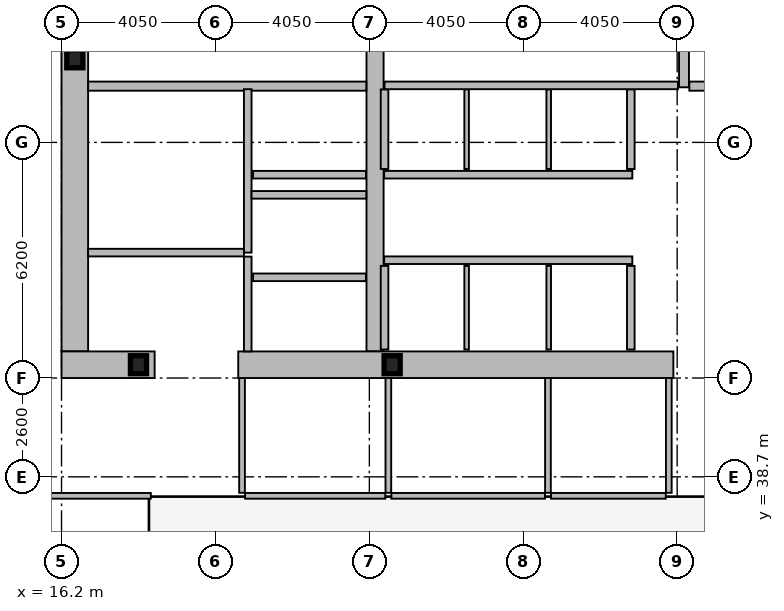
"""IFC4 building model, lengths in metres.
Left out: names, types, materials, properties, quantities, classifications, styles, units other than length and angle.
Written with IfcOpenShell. Run it as: python <this file> out.ifc"""

import sys

from ifc_helpers import new_model, si_unit, direction, frame, frame_2d, origin, origin_2d, place, context, subcontext, project, spatial, rectangle, i_section, extrude, element, fill, save


model = new_model("IFC4")
c1 = context("Model", 3, precision=1e-05, world=origin(), true_north=direction((0.0, 1.0)))
c2 = subcontext(c1, "Body", "Model", "MODEL_VIEW")
j1 = project(units=[si_unit("LENGTHUNIT", "METRE"), si_unit("PLANEANGLEUNIT", "RADIAN")], contexts=[c1])
p1 = place(None, origin())
s1 = spatial("IfcSite", under=j1, at=p1, CompositionType="ELEMENT")
p2 = place(p1, origin())
s2 = spatial("IfcBuilding", under=s1, at=p2, CompositionType="ELEMENT")
p3 = place(p2, frame((0.0, 0.0, 106.6)))
s3 = spatial("IfcBuildingStorey", under=s2, at=p3, CompositionType="ELEMENT", Elevation=106.6)
p4 = place(p3, frame((16.55, 42.0, 0.0), z_axis=(0.0, 0.0, 1.0), x_axis=(0.0, 1.0, 0.0)))
e1 = element("IfcWall", 1, at=p4, inside=s3, PredefinedType="SHEAR", context=c2, shape_type="SweptSolid", body=[
    extrude(rectangle(XDim=11.0, YDim=0.7, at=frame_2d((5.5, 0.0))), origin(), (0.0, 0.0, 1.0), 4.24),
])
p5 = place(p3, frame((24.45, 42.0, 0.0), z_axis=(0.0, 0.0, 1.0), x_axis=(0.0, 1.0, 0.0)))
e2 = element("IfcWall", 2, at=p5, inside=s3, PredefinedType="SHEAR", context=c2, shape_type="SweptSolid", body=[
    extrude(rectangle(XDim=11.0, YDim=0.45, at=frame_2d((5.5, 0.0))), origin(), (0.0, 0.0, 1.0), 4.24),
])
p6 = place(p3, frame((18.65, 41.65, 0.0), z_axis=(0.0, 0.0, 1.0), x_axis=(-1.0, 0.0, 0.0)))
e3 = element("IfcWall", 3, at=p6, inside=s3, PredefinedType="SHEAR", context=c2, shape_type="SweptSolid", body=[
    extrude(rectangle(XDim=2.45, YDim=0.7, at=frame_2d((1.225, 0.0))), origin(), (0.0, 0.0, 1.0), 4.24),
])
p7 = place(p3, frame((32.3, 41.65, 0.0), z_axis=(0.0, 0.0, 1.0), x_axis=(-1.0, 0.0, 0.0)))
e4 = element("IfcWall", 4, at=p7, inside=s3, PredefinedType="SHEAR", context=c2, shape_type="SweptSolid", body=[
    extrude(rectangle(XDim=11.45, YDim=0.7, at=frame_2d((5.725, 0.0))), origin(), (0.0, 0.0, 1.0), 4.24),
])
p8 = place(p3, frame((32.58, 48.95, 0.0), z_axis=(0.0, 0.0, 1.0), x_axis=(0.0, 1.0, 0.0)))
e5 = element("IfcWall", 5, at=p8, inside=s3, PredefinedType="SHEAR", context=c2, shape_type="SweptSolid", body=[
    extrude(rectangle(XDim=4.05, YDim=0.26, at=frame_2d((2.025, 0.0))), origin(), (0.0, 0.0, 1.0), 4.24),
])
p9 = place(p3, frame((16.9, 48.98, 0.0), z_axis=(0.0, 0.0, 1.0), x_axis=(1.0, 0.0, 0.0)))
e6 = element("IfcWall", 6, at=p9, inside=s3, PredefinedType="SHEAR", context=c2, shape_type="SweptSolid", body=[
    extrude(rectangle(XDim=7.32, YDim=0.24, at=frame_2d((3.66, 0.0))), origin(), (0.0, 0.0, 1.0), 4.24),
])
p10 = place(p9, frame((0.22, 0.0, 0.0)))
e7 = element("IfcOpeningElement", 7, at=p10, cuts=e6, PredefinedType="OPENING", context=c2, shape_type="SweptSolid", body=[
    extrude(rectangle(XDim=1.05, YDim=2.15, at=frame_2d((0.525, 1.075))), frame((0.0, 0.13, 0.0), z_axis=(0.0, -1.0, 0.0), x_axis=(1.0, 0.0, 0.0)), (0.0, 0.0, 1.0), 0.26),
])
p11 = place(p3, frame((32.72, 48.98, 0.0), z_axis=(0.0, 0.0, 1.0), x_axis=(1.0, 0.0, 0.0)))
e8 = element("IfcWall", 8, at=p11, inside=s3, PredefinedType="SHEAR", context=c2, shape_type="SweptSolid", body=[
    extrude(rectangle(XDim=7.56, YDim=0.24, at=frame_2d((3.78, 0.0))), origin(), (0.0, 0.0, 1.0), 4.24),
])
p12 = place(p11, frame((0.22, 0.0, 0.0)))
e9 = element("IfcOpeningElement", 9, at=p12, cuts=e8, PredefinedType="OPENING", context=c2, shape_type="SweptSolid", body=[
    extrude(rectangle(XDim=1.05, YDim=2.15, at=frame_2d((0.525, 1.075))), frame((0.0, 0.13, 0.0), z_axis=(0.0, -1.0, 0.0), x_axis=(1.0, 0.0, 0.0)), (0.0, 0.0, 1.0), 0.26),
])
for number, where, z_axis, x_axis in (
    (10, (16.55, 49.7, 0.0), (0.0, 0.0, 1.0), (1.0, 0.0, 0.0)),
    (11, (18.225, 41.65, 0.0), (0.0, 0.0, 1.0), (1.0, 0.0, 0.0)),
    (12, (24.9, 41.65, 0.0), (0.0, 0.0, 1.0), (1.0, 0.0, 0.0)),
):
    element("IfcColumn", number, at=place(p3, frame(where, z_axis=z_axis, x_axis=x_axis)), inside=s3, PredefinedType="COLUMN", context=c2, shape_type="SweptSolid", body=[
        extrude(i_section(OverallWidth=0.424, OverallDepth=0.474, WebThickness=0.048, FlangeThickness=0.077, at=origin_2d()), origin(), (0.0, 0.0, 1.0), 4.4),
    ])
p13 = place(p3, frame((24.69, 44.4, 0.0), z_axis=(0.0, 0.0, 1.0), x_axis=(1.0, 0.0, 0.0)))
e13 = element("IfcWall", 13, at=p13, inside=s3, PredefinedType="PARTITIONING", context=c2, shape_type="SweptSolid", body=[
    extrude(rectangle(XDim=6.53, YDim=0.2, at=frame_2d((3.265, 0.0))), origin(), (0.0, 0.0, 1.0), 4.24),
])
p14 = place(p13, frame((0.53, 0.0, 0.0)))
e14 = element("IfcOpeningElement", 14, at=p14, cuts=e13, PredefinedType="OPENING", context=c2, shape_type="SweptSolid", body=[
    extrude(rectangle(XDim=1.1, YDim=2.18, at=frame_2d((0.55, 1.09))), frame((0.0, 0.11, 0.0), z_axis=(0.0, -1.0, 0.0), x_axis=(1.0, 0.0, 0.0)), (0.0, 0.0, 1.0), 0.22),
])
p15 = place(p13, frame((2.69, 0.0, 0.0)))
e15 = element("IfcOpeningElement", 15, at=p15, cuts=e13, PredefinedType="OPENING", context=c2, shape_type="SweptSolid", body=[
    extrude(rectangle(XDim=1.1, YDim=2.18, at=frame_2d((0.55, 1.09))), frame((0.0, 0.11, 0.0), z_axis=(0.0, -1.0, 0.0), x_axis=(1.0, 0.0, 0.0)), (0.0, 0.0, 1.0), 0.22),
])
p16 = place(p13, frame((4.85, 0.0, 0.0)))
e16 = element("IfcOpeningElement", 16, at=p16, cuts=e13, PredefinedType="OPENING", context=c2, shape_type="SweptSolid", body=[
    extrude(rectangle(XDim=1.1, YDim=2.18, at=frame_2d((0.55, 1.09))), frame((0.0, 0.11, 0.0), z_axis=(0.0, -1.0, 0.0), x_axis=(1.0, 0.0, 0.0)), (0.0, 0.0, 1.0), 0.22),
])
p17 = place(p3, frame((24.21, 43.95, 0.0), z_axis=(0.0, 0.0, 1.0), x_axis=(-1.0, 0.0, 0.0)))
e17 = element("IfcWall", 17, at=p17, inside=s3, PredefinedType="PARTITIONING", context=c2, shape_type="SweptSolid", body=[
    extrude(rectangle(XDim=2.97, YDim=0.2, at=frame_2d((1.485, 0.0))), origin(), (0.0, 0.0, 1.0), 4.24),
])
p18 = place(p17, frame((0.86, 0.0, 0.0)))
e18 = element("IfcOpeningElement", 18, at=p18, cuts=e17, PredefinedType="OPENING", context=c2, shape_type="SweptSolid", body=[
    extrude(rectangle(XDim=1.3, YDim=2.18, at=frame_2d((0.65, 1.09))), frame((0.0, 0.11, 0.0), z_axis=(0.0, -1.0, 0.0), x_axis=(1.0, 0.0, 0.0)), (0.0, 0.0, 1.0), 0.22),
])
p19 = place(p3, frame((24.21, 46.65, 0.0), z_axis=(0.0, 0.0, 1.0), x_axis=(-1.0, 0.0, 0.0)))
e19 = element("IfcWall", 19, at=p19, inside=s3, PredefinedType="PARTITIONING", context=c2, shape_type="SweptSolid", body=[
    extrude(rectangle(XDim=2.97, YDim=0.2, at=frame_2d((1.485, 0.0))), origin(), (0.0, 0.0, 1.0), 4.24),
])
p20 = place(p19, frame((0.91, 0.0, 0.0)))
e20 = element("IfcOpeningElement", 20, at=p20, cuts=e19, PredefinedType="OPENING", context=c2, shape_type="SweptSolid", body=[
    extrude(rectangle(XDim=1.2, YDim=2.18, at=frame_2d((0.6, 1.09))), frame((0.0, 0.11, 0.0), z_axis=(0.0, -1.0, 0.0), x_axis=(1.0, 0.0, 0.0)), (0.0, 0.0, 1.0), 0.22),
])
p21 = place(p3, frame((31.22, 46.65, 0.0), z_axis=(0.0, 0.0, 1.0), x_axis=(-1.0, 0.0, 0.0)))
e21 = element("IfcWall", 21, at=p21, inside=s3, PredefinedType="PARTITIONING", context=c2, shape_type="SweptSolid", body=[
    extrude(rectangle(XDim=6.53, YDim=0.2, at=frame_2d((3.265, 0.0))), origin(), (0.0, 0.0, 1.0), 4.24),
])
p22 = place(p21, frame((4.9, 0.0, 0.0)))
e22 = element("IfcOpeningElement", 22, at=p22, cuts=e21, PredefinedType="OPENING", context=c2, shape_type="SweptSolid", body=[
    extrude(rectangle(XDim=1.1, YDim=2.18, at=frame_2d((0.55, 1.09))), frame((0.0, 0.11, 0.0), z_axis=(0.0, -1.0, 0.0), x_axis=(1.0, 0.0, 0.0)), (0.0, 0.0, 1.0), 0.22),
])
p23 = place(p21, frame((2.74, 0.0, 0.0)))
e23 = element("IfcOpeningElement", 23, at=p23, cuts=e21, PredefinedType="OPENING", context=c2, shape_type="SweptSolid", body=[
    extrude(rectangle(XDim=1.1, YDim=2.18, at=frame_2d((0.55, 1.09))), frame((0.0, 0.11, 0.0), z_axis=(0.0, -1.0, 0.0), x_axis=(1.0, 0.0, 0.0)), (0.0, 0.0, 1.0), 0.22),
])
p24 = place(p21, frame((0.58, 0.0, 0.0)))
e24 = element("IfcOpeningElement", 24, at=p24, cuts=e21, PredefinedType="OPENING", context=c2, shape_type="SweptSolid", body=[
    extrude(rectangle(XDim=1.1, YDim=2.18, at=frame_2d((0.55, 1.09))), frame((0.0, 0.11, 0.0), z_axis=(0.0, -1.0, 0.0), x_axis=(1.0, 0.0, 0.0)), (0.0, 0.0, 1.0), 0.22),
])
p25 = place(p3, frame((21.1, 44.6, 0.0), z_axis=(0.0, 0.0, 1.0), x_axis=(0.0, 1.0, 0.0)))
e25 = element("IfcWall", 25, at=p25, inside=s3, PredefinedType="PARTITIONING", context=c2, shape_type="SweptSolid", body=[
    extrude(rectangle(XDim=4.3, YDim=0.2, at=frame_2d((2.15, 0.0))), origin(), (0.0, 0.0, 1.0), 4.24),
])
p26 = place(p3, frame((16.9, 44.6, 0.0), z_axis=(0.0, 0.0, 1.0), x_axis=(1.0, 0.0, 0.0)))
e26 = element("IfcWall", 26, at=p26, inside=s3, PredefinedType="PARTITIONING", context=c2, shape_type="SweptSolid", body=[
    extrude(rectangle(XDim=4.1, YDim=0.2, at=frame_2d((2.05, 0.0))), origin(), (0.0, 0.0, 1.0), 4.24),
])
p27 = place(p26, frame((1.25, 0.0, 0.0)))
e27 = element("IfcOpeningElement", 27, at=p27, cuts=e26, PredefinedType="OPENING", context=c2, shape_type="SweptSolid", body=[
    extrude(rectangle(XDim=1.05, YDim=2.15, at=frame_2d((0.525, 1.075))), frame((0.0, 0.11, 0.0), z_axis=(0.0, -1.0, 0.0), x_axis=(1.0, 0.0, 0.0)), (0.0, 0.0, 1.0), 0.22),
])
p28 = place(p3, frame((21.2, 46.12, 0.0), z_axis=(0.0, 0.0, 1.0), x_axis=(1.0, 0.0, 0.0)))
e28 = element("IfcWall", 28, at=p28, inside=s3, PredefinedType="PARTITIONING", context=c2, shape_type="SweptSolid", body=[
    extrude(rectangle(XDim=3.02, YDim=0.2, at=frame_2d((1.51, 0.0))), origin(), (0.0, 0.0, 1.0), 4.24),
])
p29 = place(p3, frame((21.1, 42.0, 0.0), z_axis=(0.0, 0.0, 1.0), x_axis=(0.0, 1.0, 0.0)))
e29 = element("IfcWall", 29, at=p29, inside=s3, PredefinedType="PARTITIONING", context=c2, shape_type="SweptSolid", body=[
    extrude(rectangle(XDim=2.495, YDim=0.2, at=frame_2d((1.248, 0.0))), origin(), (0.0, 0.0, 1.0), 4.24),
])
p30 = place(p29, frame((0.38, 0.0, 0.0)))
e30 = element("IfcOpeningElement", 30, at=p30, cuts=e29, PredefinedType="OPENING", context=c2, shape_type="SweptSolid", body=[
    extrude(rectangle(XDim=1.05, YDim=2.15, at=frame_2d((0.525, 1.075))), frame((0.0, 0.11, 0.0), z_axis=(0.0, -1.0, 0.0), x_axis=(1.0, 0.0, 0.0)), (0.0, 0.0, 1.0), 0.22),
])
for number, where, z_axis, x_axis in (
    (31, (24.7, 46.8, 0.0), (0.0, 0.0, 1.0), (0.0, 1.0, 0.0)),
    (32, (31.18, 46.8, 0.0), (0.0, 0.0, 1.0), (0.0, 1.0, 0.0)),
):
    element("IfcWall", number, at=place(p3, frame(where, z_axis=z_axis, x_axis=x_axis)), inside=s3, PredefinedType="PARTITIONING", context=c2, shape_type="SweptSolid", body=[
        extrude(rectangle(XDim=2.095, YDim=0.2, at=frame_2d((1.047, 0.0))), origin(), (0.0, 0.0, 1.0), 4.24),
    ])
for number, where, z_axis, x_axis in (
    (33, (26.86, 46.8, 0.0), (0.0, 0.0, 1.0), (0.0, 1.0, 0.0)),
    (34, (29.02, 46.8, 0.0), (0.0, 0.0, 1.0), (0.0, 1.0, 0.0)),
):
    element("IfcWall", number, at=place(p3, frame(where, z_axis=z_axis, x_axis=x_axis)), inside=s3, PredefinedType="PARTITIONING", context=c2, shape_type="SweptSolid", body=[
        extrude(rectangle(XDim=2.095, YDim=0.12, at=frame_2d((1.047, 0.0))), origin(), (0.0, 0.0, 1.0), 4.24),
    ])
for number, where, z_axis, x_axis in (
    (35, (24.7, 42.05, 0.0), (0.0, 0.0, 1.0), (0.0, 1.0, 0.0)),
    (36, (31.18, 42.05, 0.0), (0.0, 0.0, 1.0), (0.0, 1.0, 0.0)),
):
    element("IfcWall", number, at=place(p3, frame(where, z_axis=z_axis, x_axis=x_axis)), inside=s3, PredefinedType="PARTITIONING", context=c2, shape_type="SweptSolid", body=[
        extrude(rectangle(XDim=2.2, YDim=0.2, at=frame_2d((1.1, 0.0))), origin(), (0.0, 0.0, 1.0), 4.24),
    ])
for number, where, z_axis, x_axis in (
    (37, (26.86, 42.05, 0.0), (0.0, 0.0, 1.0), (0.0, 1.0, 0.0)),
    (38, (29.02, 42.05, 0.0), (0.0, 0.0, 1.0), (0.0, 1.0, 0.0)),
):
    element("IfcWall", number, at=place(p3, frame(where, z_axis=z_axis, x_axis=x_axis)), inside=s3, PredefinedType="PARTITIONING", context=c2, shape_type="SweptSolid", body=[
        extrude(rectangle(XDim=2.2, YDim=0.12, at=frame_2d((1.1, 0.0))), origin(), (0.0, 0.0, 1.0), 4.24),
    ])
p31 = place(p3, frame((24.7, 49.0, 0.0), z_axis=(0.0, 0.0, 1.0), x_axis=(1.0, 0.0, 0.0)))
e39 = element("IfcWall", 39, at=p31, inside=s3, PredefinedType="PARTITIONING", context=c2, shape_type="SweptSolid", body=[
    extrude(rectangle(XDim=7.72, YDim=0.2, at=frame_2d((3.86, 0.0))), origin(), (0.0, 0.0, 1.0), 4.24),
])
p32 = place(p31, frame((6.56, 0.0, 0.0)))
e40 = element("IfcOpeningElement", 40, at=p32, cuts=e39, PredefinedType="OPENING", context=c2, shape_type="SweptSolid", body=[
    extrude(rectangle(XDim=0.95, YDim=2.1, at=frame_2d((0.475, 1.05))), frame((0.0, 0.11, 0.0), z_axis=(0.0, -1.0, 0.0), x_axis=(1.0, 0.0, 0.0)), (0.0, 0.0, 1.0), 0.22),
])
p33 = place(p3, frame((21.03, 38.2, 0.0), z_axis=(0.0, 0.0, 1.0), x_axis=(1.0, 0.0, 0.0)))
e41 = element("IfcWall", 41, at=p33, inside=s3, PredefinedType="PARTITIONING", context=c2, shape_type="SweptSolid", body=[
    extrude(rectangle(XDim=3.69, YDim=0.15, at=frame_2d((1.845, 0.0))), origin(), (0.0, 0.0, 1.0), 3.53),
])
p34 = place(p33, frame((1.2, 0.0, 0.0)))
e42 = element("IfcOpeningElement", 42, at=p34, cuts=e41, PredefinedType="OPENING", context=c2, shape_type="SweptSolid", body=[
    extrude(rectangle(XDim=0.95, YDim=2.05, at=frame_2d((0.475, 1.025))), frame((0.0, 0.085, 0.0), z_axis=(0.0, -1.0, 0.0), x_axis=(1.0, 0.0, 0.0)), (0.0, 0.0, 1.0), 0.17),
])
p35 = place(p3, frame((24.88, 38.2, 0.0), z_axis=(0.0, 0.0, 1.0), x_axis=(1.0, 0.0, 0.0)))
e43 = element("IfcWall", 43, at=p35, inside=s3, PredefinedType="PARTITIONING", context=c2, shape_type="SweptSolid", body=[
    extrude(rectangle(XDim=4.04, YDim=0.15, at=frame_2d((2.02, 0.0))), origin(), (0.0, 0.0, 1.0), 3.53),
])
p36 = place(p35, frame((1.3, 0.0, 0.0)))
e44 = element("IfcOpeningElement", 44, at=p36, cuts=e43, PredefinedType="OPENING", context=c2, shape_type="SweptSolid", body=[
    extrude(rectangle(XDim=0.95, YDim=2.05, at=frame_2d((0.475, 1.025))), frame((0.0, 0.085, 0.0), z_axis=(0.0, -1.0, 0.0), x_axis=(1.0, 0.0, 0.0)), (0.0, 0.0, 1.0), 0.17),
])
p37 = place(p3, frame((29.08, 38.2, 0.0), z_axis=(0.0, 0.0, 1.0), x_axis=(1.0, 0.0, 0.0)))
e45 = element("IfcWall", 45, at=p37, inside=s3, PredefinedType="PARTITIONING", context=c2, shape_type="SweptSolid", body=[
    extrude(rectangle(XDim=3.02, YDim=0.15, at=frame_2d((1.51, 0.0))), origin(), (0.0, 0.0, 1.0), 3.53),
])
p38 = place(p37, frame((1.0, 0.0, 0.0)))
e46 = element("IfcOpeningElement", 46, at=p38, cuts=e45, PredefinedType="OPENING", context=c2, shape_type="SweptSolid", body=[
    extrude(rectangle(XDim=0.95, YDim=2.05, at=frame_2d((0.475, 1.025))), frame((0.0, 0.085, 0.0), z_axis=(0.0, -1.0, 0.0), x_axis=(1.0, 0.0, 0.0)), (0.0, 0.0, 1.0), 0.17),
])
p39 = place(p3, frame((20.95, 38.28, 0.0), z_axis=(0.0, 0.0, 1.0), x_axis=(0.0, 1.0, 0.0)))
e47 = element("IfcWall", 47, at=p39, inside=s3, PredefinedType="PARTITIONING", context=c2, shape_type="SweptSolid", body=[
    extrude(rectangle(XDim=3.02, YDim=0.15, at=frame_2d((1.51, 0.0))), origin(), (0.0, 0.0, 1.0), 4.24),
])
p40 = place(p3, frame((24.8, 38.28, 0.0), z_axis=(0.0, 0.0, 1.0), x_axis=(0.0, 1.0, 0.0)))
e48 = element("IfcWall", 48, at=p40, inside=s3, PredefinedType="PARTITIONING", context=c2, shape_type="SweptSolid", body=[
    extrude(rectangle(XDim=3.02, YDim=0.15, at=frame_2d((1.51, 0.0))), origin(), (0.0, 0.0, 1.0), 3.53),
])
for number, where, z_axis, x_axis in (
    (49, (29.0, 38.28, 0.0), (0.0, 0.0, 1.0), (0.0, 1.0, 0.0)),
    (50, (32.18, 38.28, 0.0), (0.0, 0.0, 1.0), (0.0, 1.0, 0.0)),
):
    element("IfcWall", number, at=place(p3, frame(where, z_axis=z_axis, x_axis=x_axis)), inside=s3, PredefinedType="PARTITIONING", context=c2, shape_type="SweptSolid", body=[
        extrude(rectangle(XDim=3.02, YDim=0.15, at=frame_2d((1.51, 0.0))), origin(), (0.0, 0.0, 1.0), 4.24),
    ])
p41 = place(p3, frame((4.03, 38.2, 0.0), z_axis=(0.0, 0.0, 1.0), x_axis=(1.0, 0.0, 0.0)))
e51 = element("IfcWall", 51, at=p41, inside=s3, PredefinedType="PARTITIONING", context=c2, shape_type="SweptSolid", body=[
    extrude(rectangle(XDim=14.52, YDim=0.15, at=frame_2d((7.26, 0.0))), origin(), (0.0, 0.0, 1.0), 3.53),
])
p42 = place(p41, frame((2.8, 0.0, 0.0)))
e52 = element("IfcOpeningElement", 52, at=p42, cuts=e51, PredefinedType="OPENING", context=c2, shape_type="SweptSolid", body=[
    extrude(rectangle(XDim=1.0, YDim=2.05, at=frame_2d((0.5, 1.025))), frame((0.0, 0.085, 0.0), z_axis=(0.0, -1.0, 0.0), x_axis=(1.0, 0.0, 0.0)), (0.0, 0.0, 1.0), 0.17),
])
p43 = place(p10, origin())
e53 = element("IfcDoor", 53, at=p43, inside=s3, OperationType="SINGLE_SWING_LEFT", PredefinedType="DOOR", context=c2, shape_type="SweptSolid", body=[
    extrude(rectangle(XDim=1.05, YDim=2.15, at=frame_2d((0.525, 1.075))), frame((0.0, 0.025, 0.0), z_axis=(0.0, -1.0, 0.0), x_axis=(1.0, 0.0, 0.0)), (0.0, 0.0, 1.0), 0.05),
])
fill(e7, e53)
p44 = place(p12, origin())
e54 = element("IfcDoor", 54, at=p44, inside=s3, OperationType="SINGLE_SWING_LEFT", PredefinedType="DOOR", context=c2, shape_type="SweptSolid", body=[
    extrude(rectangle(XDim=1.05, YDim=2.15, at=frame_2d((0.525, 1.075))), frame((0.0, 0.025, 0.0), z_axis=(0.0, -1.0, 0.0), x_axis=(1.0, 0.0, 0.0)), (0.0, 0.0, 1.0), 0.05),
])
fill(e9, e54)
p45 = place(p14, origin())
e55 = element("IfcDoor", 55, at=p45, inside=s3, OperationType="SLIDING_TO_LEFT", PredefinedType="DOOR", context=c2, shape_type="SweptSolid", body=[
    extrude(rectangle(XDim=1.1, YDim=2.18, at=frame_2d((0.55, 1.09))), frame((0.0, 0.025, 0.0), z_axis=(0.0, -1.0, 0.0), x_axis=(1.0, 0.0, 0.0)), (0.0, 0.0, 1.0), 0.05),
])
fill(e14, e55)
p46 = place(p15, origin())
e56 = element("IfcDoor", 56, at=p46, inside=s3, OperationType="SLIDING_TO_LEFT", PredefinedType="DOOR", context=c2, shape_type="SweptSolid", body=[
    extrude(rectangle(XDim=1.1, YDim=2.18, at=frame_2d((0.55, 1.09))), frame((0.0, 0.025, 0.0), z_axis=(0.0, -1.0, 0.0), x_axis=(1.0, 0.0, 0.0)), (0.0, 0.0, 1.0), 0.05),
])
fill(e15, e56)
p47 = place(p16, origin())
e57 = element("IfcDoor", 57, at=p47, inside=s3, OperationType="SLIDING_TO_LEFT", PredefinedType="DOOR", context=c2, shape_type="SweptSolid", body=[
    extrude(rectangle(XDim=1.1, YDim=2.18, at=frame_2d((0.55, 1.09))), frame((0.0, 0.025, 0.0), z_axis=(0.0, -1.0, 0.0), x_axis=(1.0, 0.0, 0.0)), (0.0, 0.0, 1.0), 0.05),
])
fill(e16, e57)
p48 = place(p18, origin())
e58 = element("IfcDoor", 58, at=p48, inside=s3, OperationType="SLIDING_TO_LEFT", PredefinedType="DOOR", context=c2, shape_type="SweptSolid", body=[
    extrude(rectangle(XDim=1.3, YDim=2.18, at=frame_2d((0.65, 1.09))), frame((0.0, 0.025, 0.0), z_axis=(0.0, -1.0, 0.0), x_axis=(1.0, 0.0, 0.0)), (0.0, 0.0, 1.0), 0.05),
])
fill(e18, e58)
p49 = place(p20, origin())
e59 = element("IfcDoor", 59, at=p49, inside=s3, OperationType="SLIDING_TO_LEFT", PredefinedType="DOOR", context=c2, shape_type="SweptSolid", body=[
    extrude(rectangle(XDim=1.2, YDim=2.18, at=frame_2d((0.6, 1.09))), frame((0.0, 0.025, 0.0), z_axis=(0.0, -1.0, 0.0), x_axis=(1.0, 0.0, 0.0)), (0.0, 0.0, 1.0), 0.05),
])
fill(e20, e59)
p50 = place(p22, origin())
e60 = element("IfcDoor", 60, at=p50, inside=s3, OperationType="SLIDING_TO_LEFT", PredefinedType="DOOR", context=c2, shape_type="SweptSolid", body=[
    extrude(rectangle(XDim=1.1, YDim=2.18, at=frame_2d((0.55, 1.09))), frame((0.0, 0.025, 0.0), z_axis=(0.0, -1.0, 0.0), x_axis=(1.0, 0.0, 0.0)), (0.0, 0.0, 1.0), 0.05),
])
fill(e22, e60)
p51 = place(p23, origin())
e61 = element("IfcDoor", 61, at=p51, inside=s3, OperationType="SLIDING_TO_LEFT", PredefinedType="DOOR", context=c2, shape_type="SweptSolid", body=[
    extrude(rectangle(XDim=1.1, YDim=2.18, at=frame_2d((0.55, 1.09))), frame((0.0, 0.025, 0.0), z_axis=(0.0, -1.0, 0.0), x_axis=(1.0, 0.0, 0.0)), (0.0, 0.0, 1.0), 0.05),
])
fill(e23, e61)
p52 = place(p24, origin())
e62 = element("IfcDoor", 62, at=p52, inside=s3, OperationType="SLIDING_TO_LEFT", PredefinedType="DOOR", context=c2, shape_type="SweptSolid", body=[
    extrude(rectangle(XDim=1.1, YDim=2.18, at=frame_2d((0.55, 1.09))), frame((0.0, 0.025, 0.0), z_axis=(0.0, -1.0, 0.0), x_axis=(1.0, 0.0, 0.0)), (0.0, 0.0, 1.0), 0.05),
])
fill(e24, e62)
p53 = place(p27, origin())
e63 = element("IfcDoor", 63, at=p53, inside=s3, OperationType="SINGLE_SWING_RIGHT", PredefinedType="DOOR", context=c2, shape_type="SweptSolid", body=[
    extrude(rectangle(XDim=1.05, YDim=2.15, at=frame_2d((0.525, 1.075))), frame((0.0, 0.025, 0.0), z_axis=(0.0, -1.0, 0.0), x_axis=(1.0, 0.0, 0.0)), (0.0, 0.0, 1.0), 0.05),
])
fill(e27, e63)
p54 = place(p30, origin())
e64 = element("IfcDoor", 64, at=p54, inside=s3, OperationType="SINGLE_SWING_LEFT", PredefinedType="DOOR", context=c2, shape_type="SweptSolid", body=[
    extrude(rectangle(XDim=1.05, YDim=2.15, at=frame_2d((0.525, 1.075))), frame((0.0, 0.025, 0.0), z_axis=(0.0, -1.0, 0.0), x_axis=(1.0, 0.0, 0.0)), (0.0, 0.0, 1.0), 0.05),
])
fill(e30, e64)
p55 = place(p32, origin())
e65 = element("IfcDoor", 65, at=p55, inside=s3, OperationType="SINGLE_SWING_RIGHT", PredefinedType="DOOR", context=c2, shape_type="SweptSolid", body=[
    extrude(rectangle(XDim=0.95, YDim=2.1, at=frame_2d((0.475, 1.05))), frame((0.0, 0.025, 0.0), z_axis=(0.0, -1.0, 0.0), x_axis=(1.0, 0.0, 0.0)), (0.0, 0.0, 1.0), 0.05),
])
fill(e40, e65)
p56 = place(p34, origin())
e66 = element("IfcDoor", 66, at=p56, inside=s3, OperationType="SINGLE_SWING_RIGHT", PredefinedType="DOOR", context=c2, shape_type="SweptSolid", body=[
    extrude(rectangle(XDim=0.95, YDim=2.05, at=frame_2d((0.475, 1.025))), frame((0.0, 0.025, 0.0), z_axis=(0.0, -1.0, 0.0), x_axis=(1.0, 0.0, 0.0)), (0.0, 0.0, 1.0), 0.05),
])
fill(e42, e66)
p57 = place(p36, origin())
e67 = element("IfcDoor", 67, at=p57, inside=s3, OperationType="SINGLE_SWING_LEFT", PredefinedType="DOOR", context=c2, shape_type="SweptSolid", body=[
    extrude(rectangle(XDim=0.95, YDim=2.05, at=frame_2d((0.475, 1.025))), frame((0.0, 0.025, 0.0), z_axis=(0.0, -1.0, 0.0), x_axis=(1.0, 0.0, 0.0)), (0.0, 0.0, 1.0), 0.05),
])
fill(e44, e67)
p58 = place(p38, origin())
e68 = element("IfcDoor", 68, at=p58, inside=s3, OperationType="SINGLE_SWING_RIGHT", PredefinedType="DOOR", context=c2, shape_type="SweptSolid", body=[
    extrude(rectangle(XDim=0.95, YDim=2.05, at=frame_2d((0.475, 1.025))), frame((0.0, 0.025, 0.0), z_axis=(0.0, -1.0, 0.0), x_axis=(1.0, 0.0, 0.0)), (0.0, 0.0, 1.0), 0.05),
])
fill(e46, e68)
save(model, sys.argv[1])
